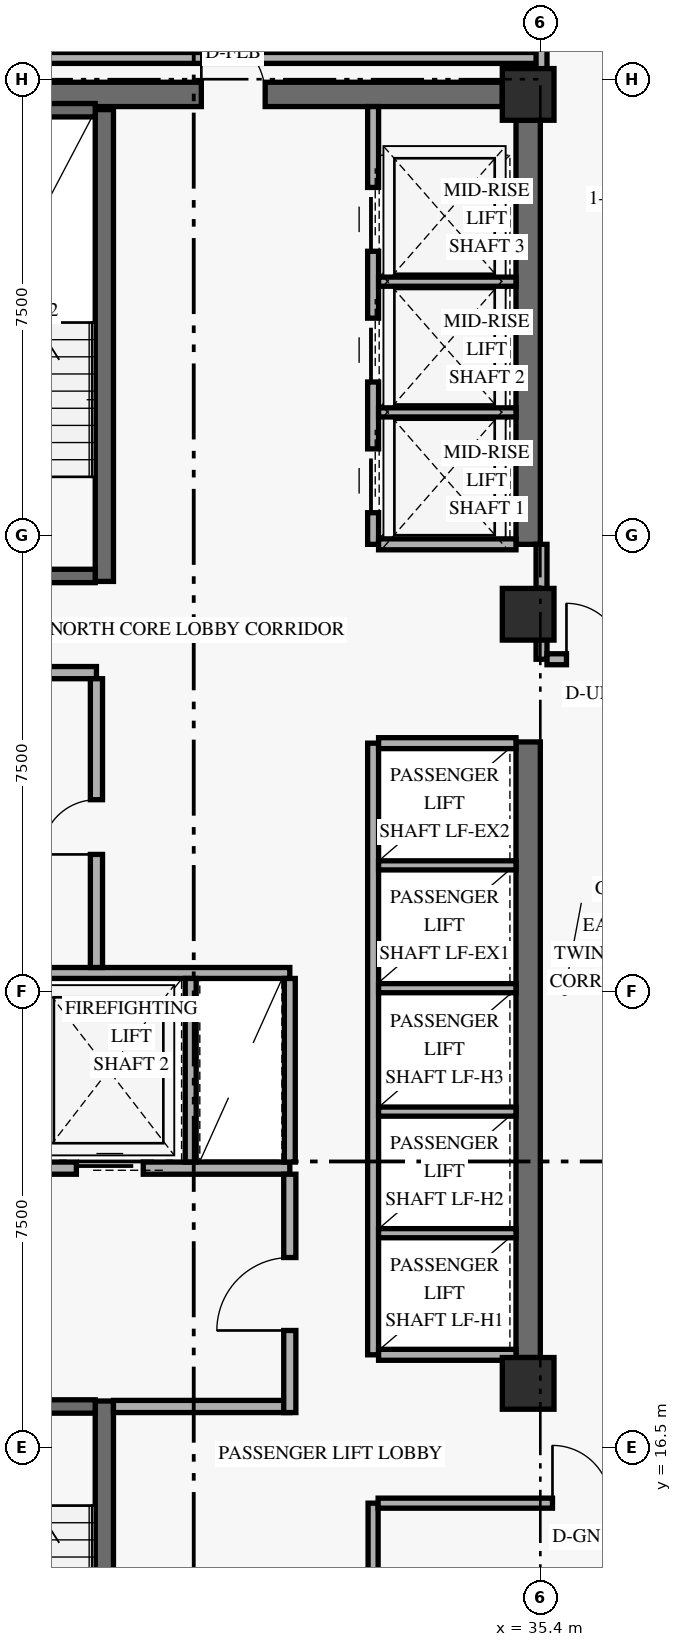
"""IFC4 building model, lengths in metres.
Left out: names, types, materials, properties, quantities, classifications, styles, units other than length and angle.
Written with IfcOpenShell. Run it as: python <this file> out.ifc"""

import sys

from ifc_helpers import new_model, si_unit, direction, frame, frame_2d, origin, origin_2d, place, context, subcontext, project, spatial, rectangle, extrude, element, fill, save


model = new_model("IFC4")
c1 = context("Model", 3, precision=1e-05, world=origin(), true_north=direction((0.0, 1.0)))
c2 = subcontext(c1, "Body", "Model", "MODEL_VIEW")
j1 = project(units=[si_unit("LENGTHUNIT", "METRE"), si_unit("PLANEANGLEUNIT", "RADIAN")], contexts=[c1])
p1 = place(None, origin())
s1 = spatial("IfcSite", under=j1, at=p1, CompositionType="ELEMENT")
p2 = place(p1, origin())
s2 = spatial("IfcBuilding", under=s1, at=p2, CompositionType="ELEMENT")
p3 = place(p2, frame((0.0, 0.0, 106.2)))
s3 = spatial("IfcBuildingStorey", under=s2, at=p3, CompositionType="ELEMENT", Elevation=106.2)
p4 = place(p3, frame((35.2, 17.975, 0.0), z_axis=(0.0, 0.0, 1.0), x_axis=(0.0, 1.0, 0.0)))
e1 = element("IfcWall", 1, at=p4, inside=s3, PredefinedType="SHEAR", context=c2, shape_type="SweptSolid", body=[
    extrude(rectangle(XDim=10.125, YDim=0.4, at=frame_2d((5.062, 0.0))), origin(), (0.0, 0.0, 1.0), 2.749),
])
p5 = place(p3, frame((35.2, 31.35, 0.0), z_axis=(0.0, 0.0, 1.0), x_axis=(0.0, 1.0, 0.0)))
e2 = element("IfcWall", 2, at=p5, inside=s3, PredefinedType="SHEAR", context=c2, shape_type="SweptSolid", body=[
    extrude(rectangle(XDim=6.975, YDim=0.4, at=frame_2d((3.487, 0.0))), origin(), (0.0, 0.0, 1.0), 2.749),
])
p6 = place(p3, frame((24.625, 38.75, 0.0), z_axis=(0.0, 0.0, 1.0), x_axis=(1.0, 0.0, 0.0)))
e3 = element("IfcWall", 3, at=p6, inside=s3, PredefinedType="SHEAR", context=c2, shape_type="SweptSolid", body=[
    extrude(rectangle(XDim=10.15, YDim=0.4, at=frame_2d((5.075, 0.0))), origin(), (0.0, 0.0, 1.0), 3.36),
])
p7 = place(p6, frame((5.2, 0.0, 0.0)))
e4 = element("IfcOpeningElement", 4, at=p7, cuts=e3, PredefinedType="OPENING", context=c2, shape_type="SweptSolid", body=[
    extrude(rectangle(XDim=1.05, YDim=2.15, at=frame_2d((0.525, 1.075))), frame((0.0, 0.21, 0.0), z_axis=(0.0, -1.0, 0.0), x_axis=(1.0, 0.0, 0.0)), (0.0, 0.0, 1.0), 0.42),
])
p8 = place(p3, frame((28.23, 9.5, 0.0), z_axis=(0.0, 0.0, 1.0), x_axis=(0.0, 1.0, 0.0)))
e5 = element("IfcWall", 5, at=p8, inside=s3, PredefinedType="SHEAR", context=c2, shape_type="SweptSolid", body=[
    extrude(rectangle(XDim=7.76, YDim=0.3, at=frame_2d((3.88, 0.0))), origin(), (0.0, 0.0, 1.0), 3.36),
])
p9 = place(p3, frame((24.92, 17.17, 0.0), z_axis=(0.0, 0.0, 1.0), x_axis=(1.0, 0.0, 0.0)))
e6 = element("IfcWall", 6, at=p9, inside=s3, PredefinedType="SHEAR", context=c2, shape_type="SweptSolid", body=[
    extrude(rectangle(XDim=3.16, YDim=0.22, at=frame_2d((1.58, 0.0))), origin(), (0.0, 0.0, 1.0), 3.36),
])
p10 = place(p9, frame((0.78, 0.0, 0.0)))
e7 = element("IfcOpeningElement", 7, at=p10, cuts=e6, PredefinedType="OPENING", context=c2, shape_type="SweptSolid", body=[
    extrude(rectangle(XDim=1.05, YDim=2.15, at=frame_2d((0.525, 1.075))), frame((0.0, 0.12, 0.0), z_axis=(0.0, -1.0, 0.0), x_axis=(1.0, 0.0, 0.0)), (0.0, 0.0, 1.0), 0.24),
])
p11 = place(p3, frame((28.23, 30.74, 0.0), z_axis=(0.0, 0.0, 1.0), x_axis=(0.0, 1.0, 0.0)))
e8 = element("IfcWall", 8, at=p11, inside=s3, PredefinedType="SHEAR", context=c2, shape_type="SweptSolid", body=[
    extrude(rectangle(XDim=7.76, YDim=0.3, at=frame_2d((3.88, 0.0))), origin(), (0.0, 0.0, 1.0), 3.36),
])
p12 = place(p3, frame((24.92, 30.83, 0.0), z_axis=(0.0, 0.0, 1.0), x_axis=(1.0, 0.0, 0.0)))
e9 = element("IfcWall", 9, at=p12, inside=s3, PredefinedType="SHEAR", context=c2, shape_type="SweptSolid", body=[
    extrude(rectangle(XDim=3.16, YDim=0.22, at=frame_2d((1.58, 0.0))), origin(), (0.0, 0.0, 1.0), 3.36),
])
p13 = place(p12, frame((0.78, 0.0, 0.0)))
e10 = element("IfcOpeningElement", 10, at=p13, cuts=e9, PredefinedType="OPENING", context=c2, shape_type="SweptSolid", body=[
    extrude(rectangle(XDim=1.05, YDim=2.15, at=frame_2d((0.525, 1.075))), frame((0.0, 0.12, 0.0), z_axis=(0.0, -1.0, 0.0), x_axis=(1.0, 0.0, 0.0)), (0.0, 0.0, 1.0), 0.24),
])
p14 = place(p3, frame((24.92, 38.49, 0.0), z_axis=(0.0, 0.0, 1.0), x_axis=(1.0, 0.0, 0.0)))
e11 = element("IfcWall", 11, at=p14, inside=s3, PredefinedType="SHEAR", context=c2, shape_type="SweptSolid", body=[
    extrude(rectangle(XDim=3.16, YDim=0.22, at=frame_2d((1.58, 0.0))), origin(), (0.0, 0.0, 1.0), 3.36),
])
for number, where, z_axis, x_axis in (
    (12, (35.2, 17.55, 0.0), (0.0, 0.0, 1.0), (1.0, 0.0, 0.0)),
    (13, (35.2, 30.2, 0.0), (0.0, 0.0, 1.0), (1.0, 0.0, 0.0)),
    (14, (35.2, 38.75, 0.0), (0.0, 0.0, 1.0), (1.0, 0.0, 0.0)),
):
    element("IfcColumn", number, at=place(p3, frame(where, z_axis=z_axis, x_axis=x_axis)), inside=s3, PredefinedType="COLUMN", context=c2, shape_type="SweptSolid", body=[
        extrude(rectangle(XDim=0.85, YDim=0.85, at=origin_2d()), origin(), (0.0, 0.0, 1.0), 3.6),
    ])
p15 = place(p3, frame((24.45, 21.09, 0.0), z_axis=(0.0, 0.0, 1.0), x_axis=(1.0, 0.0, 0.0)))
e15 = element("IfcWall", 15, at=p15, inside=s3, PredefinedType="STANDARD", context=c2, shape_type="SweptSolid", body=[
    extrude(rectangle(XDim=6.83, YDim=0.2, at=frame_2d((3.415, 0.0))), origin(), (0.0, 0.0, 1.0), 3.36),
])
p16 = place(p15, frame((0.72, 0.0, 0.0)))
e16 = element("IfcOpeningElement", 16, at=p16, cuts=e15, PredefinedType="OPENING", context=c2, shape_type="SweptSolid", body=[
    extrude(rectangle(XDim=1.1, YDim=2.2, at=frame_2d((0.55, 1.1))), frame((0.0, 0.11, 0.0), z_axis=(0.0, -1.0, 0.0), x_axis=(1.0, 0.0, 0.0)), (0.0, 0.0, 1.0), 0.22),
])
p17 = place(p15, frame((3.32, 0.0, 0.0)))
e17 = element("IfcOpeningElement", 17, at=p17, cuts=e15, PredefinedType="OPENING", context=c2, shape_type="SweptSolid", body=[
    extrude(rectangle(XDim=1.1, YDim=2.2, at=frame_2d((0.55, 1.1))), frame((0.0, 0.11, 0.0), z_axis=(0.0, -1.0, 0.0), x_axis=(1.0, 0.0, 0.0)), (0.0, 0.0, 1.0), 0.22),
])
p18 = place(p3, frame((28.38, 17.17, 0.0), z_axis=(0.0, 0.0, 1.0), x_axis=(1.0, 0.0, 0.0)))
e18 = element("IfcWall", 18, at=p18, inside=s3, PredefinedType="STANDARD", context=c2, shape_type="SweptSolid", body=[
    extrude(rectangle(XDim=2.9, YDim=0.2, at=frame_2d((1.45, 0.0))), origin(), (0.0, 0.0, 1.0), 3.36),
])
p19 = place(p3, frame((31.28, 17.07, 0.0), z_axis=(0.0, 0.0, 1.0), x_axis=(0.0, 1.0, 0.0)))
e19 = element("IfcWall", 19, at=p19, inside=s3, PredefinedType="STANDARD", context=c2, shape_type="SweptSolid", body=[
    extrude(rectangle(XDim=3.92, YDim=0.2, at=frame_2d((1.96, 0.0))), origin(), (0.0, 0.0, 1.0), 2.731),
])
p20 = place(p19, frame((1.35, 0.0, 0.0)))
e20 = element("IfcOpeningElement", 20, at=p20, cuts=e19, PredefinedType="OPENING", context=c2, shape_type="SweptSolid", body=[
    extrude(rectangle(XDim=1.2, YDim=2.15, at=frame_2d((0.6, 1.075))), frame((0.0, 0.11, 0.0), z_axis=(0.0, -1.0, 0.0), x_axis=(1.0, 0.0, 0.0)), (0.0, 0.0, 1.0), 0.22),
])
p21 = place(p3, frame((24.45, 24.3, 0.0), z_axis=(0.0, 0.0, 1.0), x_axis=(1.0, 0.0, 0.0)))
e21 = element("IfcWall", 21, at=p21, inside=s3, PredefinedType="STANDARD", context=c2, shape_type="SweptSolid", body=[
    extrude(rectangle(XDim=6.83, YDim=0.18, at=frame_2d((3.415, 0.0))), origin(), (0.0, 0.0, 1.0), 3.36),
])
for number, where, z_axis, x_axis in (
    (22, (29.65, 21.19, 0.0), (0.0, 0.0, 1.0), (0.0, 1.0, 0.0)),
    (23, (31.28, 21.19, 0.0), (0.0, 0.0, 1.0), (0.0, 1.0, 0.0)),
):
    element("IfcWall", number, at=place(p3, frame(where, z_axis=z_axis, x_axis=x_axis)), inside=s3, PredefinedType="STANDARD", context=c2, shape_type="SweptSolid", body=[
        extrude(rectangle(XDim=3.02, YDim=0.18, at=frame_2d((1.51, 0.0))), origin(), (0.0, 0.0, 1.0), 3.36),
    ])
p22 = place(p3, frame((24.45, 29.24, 0.0), z_axis=(0.0, 0.0, 1.0), x_axis=(1.0, 0.0, 0.0)))
e24 = element("IfcWall", 24, at=p22, inside=s3, PredefinedType="STANDARD", context=c2, shape_type="SweptSolid", body=[
    extrude(rectangle(XDim=3.65, YDim=0.2, at=frame_2d((1.825, 0.0))), origin(), (0.0, 0.0, 1.0), 3.36),
])
p23 = place(p3, frame((28.1, 24.39, 0.0), z_axis=(0.0, 0.0, 1.0), x_axis=(0.0, 1.0, 0.0)))
e25 = element("IfcWall", 25, at=p23, inside=s3, PredefinedType="STANDARD", context=c2, shape_type="SweptSolid", body=[
    extrude(rectangle(XDim=4.75, YDim=0.2, at=frame_2d((2.375, 0.0))), origin(), (0.0, 0.0, 1.0), 3.36),
])
p24 = place(p23, frame((1.86, 0.0, 0.0)))
e26 = element("IfcOpeningElement", 26, at=p24, cuts=e25, PredefinedType="OPENING", context=c2, shape_type="SweptSolid", body=[
    extrude(rectangle(XDim=0.9, YDim=2.1, at=frame_2d((0.45, 1.05))), frame((0.0, 0.11, 0.0), z_axis=(0.0, -1.0, 0.0), x_axis=(1.0, 0.0, 0.0)), (0.0, 0.0, 1.0), 0.22),
])
p25 = place(p3, frame((32.65, 18.02, 0.0), z_axis=(0.0, 0.0, 1.0), x_axis=(0.0, 1.0, 0.0)))
e27 = element("IfcWall", 27, at=p25, inside=s3, PredefinedType="STANDARD", context=c2, shape_type="SweptSolid", body=[
    extrude(rectangle(XDim=10.06, YDim=0.18, at=frame_2d((5.03, 0.0))), origin(), (0.0, 0.0, 1.0), 3.36),
])
for number, where, z_axis, x_axis in (
    (28, (32.74, 18.02, 0.0), (0.0, 0.0, 1.0), (1.0, 0.0, 0.0)),
    (29, (32.74, 28.08, 0.0), (0.0, 0.0, 1.0), (1.0, 0.0, 0.0)),
):
    element("IfcWall", number, at=place(p3, frame(where, z_axis=z_axis, x_axis=x_axis)), inside=s3, PredefinedType="STANDARD", context=c2, shape_type="SweptSolid", body=[
        extrude(rectangle(XDim=2.26, YDim=0.18, at=frame_2d((1.13, 0.0))), origin(), (0.0, 0.0, 1.0), 3.36),
    ])
for number, where, z_axis, x_axis in (
    (30, (32.74, 20.02, 0.0), (0.0, 0.0, 1.0), (1.0, 0.0, 0.0)),
    (31, (32.74, 22.02, 0.0), (0.0, 0.0, 1.0), (1.0, 0.0, 0.0)),
    (32, (32.74, 24.05, 0.0), (0.0, 0.0, 1.0), (1.0, 0.0, 0.0)),
    (33, (32.74, 26.07, 0.0), (0.0, 0.0, 1.0), (1.0, 0.0, 0.0)),
):
    element("IfcWall", number, at=place(p3, frame(where, z_axis=z_axis, x_axis=x_axis)), inside=s3, PredefinedType="STANDARD", context=c2, shape_type="SweptSolid", body=[
        extrude(rectangle(XDim=2.26, YDim=0.15, at=frame_2d((1.13, 0.0))), origin(), (0.0, 0.0, 1.0), 3.36),
    ])
p26 = place(p3, frame((32.65, 31.35, 0.0), z_axis=(0.0, 0.0, 1.0), x_axis=(0.0, 1.0, 0.0)))
e34 = element("IfcWall", 34, at=p26, inside=s3, PredefinedType="STANDARD", context=c2, shape_type="SweptSolid", body=[
    extrude(rectangle(XDim=7.2, YDim=0.18, at=frame_2d((3.6, 0.0))), origin(), (0.0, 0.0, 1.0), 3.36),
])
p27 = place(p26, frame((0.52, 0.0, 0.0)))
e35 = element("IfcOpeningElement", 35, at=p27, cuts=e34, PredefinedType="OPENING", context=c2, shape_type="SweptSolid", body=[
    extrude(rectangle(XDim=1.05, YDim=2.2, at=frame_2d((0.525, 1.1))), frame((0.0, 0.1, 0.0), z_axis=(0.0, -1.0, 0.0), x_axis=(1.0, 0.0, 0.0)), (0.0, 0.0, 1.0), 0.2),
])
p28 = place(p26, frame((2.67, 0.0, 0.0)))
e36 = element("IfcOpeningElement", 36, at=p28, cuts=e34, PredefinedType="OPENING", context=c2, shape_type="SweptSolid", body=[
    extrude(rectangle(XDim=1.05, YDim=2.2, at=frame_2d((0.525, 1.1))), frame((0.0, 0.1, 0.0), z_axis=(0.0, -1.0, 0.0), x_axis=(1.0, 0.0, 0.0)), (0.0, 0.0, 1.0), 0.2),
])
p29 = place(p26, frame((4.82, 0.0, 0.0)))
e37 = element("IfcOpeningElement", 37, at=p29, cuts=e34, PredefinedType="OPENING", context=c2, shape_type="SweptSolid", body=[
    extrude(rectangle(XDim=1.05, YDim=2.2, at=frame_2d((0.525, 1.1))), frame((0.0, 0.1, 0.0), z_axis=(0.0, -1.0, 0.0), x_axis=(1.0, 0.0, 0.0)), (0.0, 0.0, 1.0), 0.2),
])
p30 = place(p3, frame((32.74, 31.35, 0.0), z_axis=(0.0, 0.0, 1.0), x_axis=(1.0, 0.0, 0.0)))
e38 = element("IfcWall", 38, at=p30, inside=s3, PredefinedType="STANDARD", context=c2, shape_type="SweptSolid", body=[
    extrude(rectangle(XDim=2.26, YDim=0.18, at=frame_2d((1.13, 0.0))), origin(), (0.0, 0.0, 1.0), 3.36),
])
for number, where, z_axis, x_axis in (
    (39, (32.74, 33.52, 0.0), (0.0, 0.0, 1.0), (1.0, 0.0, 0.0)),
    (40, (32.74, 35.67, 0.0), (0.0, 0.0, 1.0), (1.0, 0.0, 0.0)),
):
    element("IfcWall", number, at=place(p3, frame(where, z_axis=z_axis, x_axis=x_axis)), inside=s3, PredefinedType="STANDARD", context=c2, shape_type="SweptSolid", body=[
        extrude(rectangle(XDim=2.26, YDim=0.15, at=frame_2d((1.13, 0.0))), origin(), (0.0, 0.0, 1.0), 3.36),
    ])
p31 = place(p3, frame((32.65, 9.5, 0.0), z_axis=(0.0, 0.0, 1.0), x_axis=(0.0, 1.0, 0.0)))
e41 = element("IfcWall", 41, at=p31, inside=s3, PredefinedType="PARTITIONING", context=c2, shape_type="SweptSolid", body=[
    extrude(rectangle(XDim=6.08, YDim=0.165, at=frame_2d((3.04, 0.0))), origin(), (0.0, 0.0, 1.0), 3.36),
])
p32 = place(p3, frame((32.732, 15.58, 0.0), z_axis=(0.0, 0.0, 1.0), x_axis=(1.0, 0.0, 0.0)))
e42 = element("IfcWall", 42, at=p32, inside=s3, PredefinedType="PARTITIONING", context=c2, shape_type="SweptSolid", body=[
    extrude(rectangle(XDim=5.218, YDim=0.165, at=frame_2d((2.609, 0.0))), origin(), (0.0, 0.0, 1.0), 2.731),
])
p33 = place(p32, frame((2.867, 0.0, 0.0)))
e43 = element("IfcOpeningElement", 43, at=p33, cuts=e42, PredefinedType="OPENING", context=c2, shape_type="SweptSolid", body=[
    extrude(rectangle(XDim=0.95, YDim=2.15, at=frame_2d((0.475, 1.075))), frame((0.0, 0.093, 0.0), z_axis=(0.0, -1.0, 0.0), x_axis=(1.0, 0.0, 0.0)), (0.0, 0.0, 1.0), 0.185),
])
p34 = place(p3, frame((35.42, 29.46, 0.0), z_axis=(0.0, 0.0, 1.0), x_axis=(0.0, 1.0, 0.0)))
e44 = element("IfcWall", 44, at=p34, inside=s3, PredefinedType="STANDARD", context=c2, shape_type="SweptSolid", body=[
    extrude(rectangle(XDim=1.89, YDim=0.18, at=frame_2d((0.945, 0.0))), origin(), (0.0, 0.0, 1.0), 2.731),
])
p35 = place(p3, frame((35.51, 29.46, 0.0), z_axis=(0.0, 0.0, 1.0), x_axis=(1.0, 0.0, 0.0)))
e45 = element("IfcWall", 45, at=p35, inside=s3, PredefinedType="STANDARD", context=c2, shape_type="SweptSolid", body=[
    extrude(rectangle(XDim=10.09, YDim=0.18, at=frame_2d((5.045, 0.0))), origin(), (0.0, 0.0, 1.0), 2.731),
])
p36 = place(p35, frame((0.32, 0.0, 0.0)))
e46 = element("IfcOpeningElement", 46, at=p36, cuts=e45, PredefinedType="OPENING", context=c2, shape_type="SweptSolid", body=[
    extrude(rectangle(XDim=0.92, YDim=2.15, at=frame_2d((0.46, 1.075))), frame((0.0, 0.1, 0.0), z_axis=(0.0, -1.0, 0.0), x_axis=(1.0, 0.0, 0.0)), (0.0, 0.0, 1.0), 0.2),
])
p37 = place(p3, frame((23.85, 39.35, 0.0), z_axis=(0.0, 0.0, 1.0), x_axis=(1.0, 0.0, 0.0)))
e47 = element("IfcWall", 47, at=p37, inside=s3, PredefinedType="STANDARD", context=c2, shape_type="SweptSolid", body=[
    extrude(rectangle(XDim=11.57, YDim=0.18, at=frame_2d((5.785, 0.0))), origin(), (0.0, 0.0, 1.0), 2.731),
])
p38 = place(p3, frame((35.42, 38.75, 0.0), z_axis=(0.0, 0.0, 1.0), x_axis=(0.0, 1.0, 0.0)))
e48 = element("IfcWall", 48, at=p38, inside=s3, PredefinedType="PARTITIONING", context=c2, shape_type="SweptSolid", body=[
    extrude(rectangle(XDim=6.27, YDim=0.18, at=frame_2d((3.135, 0.0))), origin(), (0.0, 0.0, 1.0), 2.731),
])
p39 = place(p17, origin())
e49 = element("IfcDoor", 49, at=p39, inside=s3, OperationType="SLIDING_TO_LEFT", PredefinedType="DOOR", context=c2, shape_type="SweptSolid", body=[
    extrude(rectangle(XDim=1.1, YDim=2.2, at=frame_2d((0.55, 1.1))), frame((0.0, 0.025, 0.0), z_axis=(0.0, -1.0, 0.0), x_axis=(1.0, 0.0, 0.0)), (0.0, 0.0, 1.0), 0.05),
])
fill(e17, e49)
p40 = place(p20, origin())
e50 = element("IfcDoor", 50, at=p40, inside=s3, OperationType="SINGLE_SWING_LEFT", PredefinedType="DOOR", context=c2, shape_type="SweptSolid", body=[
    extrude(rectangle(XDim=1.2, YDim=2.15, at=frame_2d((0.6, 1.075))), frame((0.0, 0.025, 0.0), z_axis=(0.0, -1.0, 0.0), x_axis=(1.0, 0.0, 0.0)), (0.0, 0.0, 1.0), 0.05),
])
fill(e20, e50)
p41 = place(p24, origin())
e51 = element("IfcDoor", 51, at=p41, inside=s3, OperationType="SINGLE_SWING_LEFT", PredefinedType="DOOR", context=c2, shape_type="SweptSolid", body=[
    extrude(rectangle(XDim=0.9, YDim=2.1, at=frame_2d((0.45, 1.05))), frame((0.0, 0.025, 0.0), z_axis=(0.0, -1.0, 0.0), x_axis=(1.0, 0.0, 0.0)), (0.0, 0.0, 1.0), 0.05),
])
fill(e26, e51)
p42 = place(p27, origin())
e52 = element("IfcDoor", 52, at=p42, inside=s3, OperationType="SLIDING_TO_LEFT", PredefinedType="DOOR", context=c2, shape_type="SweptSolid", body=[
    extrude(rectangle(XDim=1.05, YDim=2.2, at=frame_2d((0.525, 1.1))), frame((0.0, 0.025, 0.0), z_axis=(0.0, -1.0, 0.0), x_axis=(1.0, 0.0, 0.0)), (0.0, 0.0, 1.0), 0.05),
])
fill(e35, e52)
p43 = place(p28, origin())
e53 = element("IfcDoor", 53, at=p43, inside=s3, OperationType="SLIDING_TO_LEFT", PredefinedType="DOOR", context=c2, shape_type="SweptSolid", body=[
    extrude(rectangle(XDim=1.05, YDim=2.2, at=frame_2d((0.525, 1.1))), frame((0.0, 0.025, 0.0), z_axis=(0.0, -1.0, 0.0), x_axis=(1.0, 0.0, 0.0)), (0.0, 0.0, 1.0), 0.05),
])
fill(e36, e53)
p44 = place(p29, origin())
e54 = element("IfcDoor", 54, at=p44, inside=s3, OperationType="SLIDING_TO_LEFT", PredefinedType="DOOR", context=c2, shape_type="SweptSolid", body=[
    extrude(rectangle(XDim=1.05, YDim=2.2, at=frame_2d((0.525, 1.1))), frame((0.0, 0.025, 0.0), z_axis=(0.0, -1.0, 0.0), x_axis=(1.0, 0.0, 0.0)), (0.0, 0.0, 1.0), 0.05),
])
fill(e37, e54)
p45 = place(p33, origin())
e55 = element("IfcDoor", 55, at=p45, inside=s3, OperationType="SINGLE_SWING_LEFT", PredefinedType="DOOR", context=c2, shape_type="SweptSolid", body=[
    extrude(rectangle(XDim=0.95, YDim=2.15, at=frame_2d((0.475, 1.075))), frame((0.0, 0.025, 0.0), z_axis=(0.0, -1.0, 0.0), x_axis=(1.0, 0.0, 0.0)), (0.0, 0.0, 1.0), 0.05),
])
fill(e43, e55)
p46 = place(p7, frame((1.05, 0.0, 0.0), z_axis=(0.0, 0.0, 1.0), x_axis=(-1.0, 0.0, 0.0)))
e56 = element("IfcDoor", 56, at=p46, inside=s3, OperationType="SINGLE_SWING_RIGHT", PredefinedType="DOOR", context=c2, shape_type="SweptSolid", body=[
    extrude(rectangle(XDim=1.05, YDim=2.15, at=frame_2d((0.525, 1.075))), frame((0.0, 0.025, 0.0), z_axis=(0.0, -1.0, 0.0), x_axis=(1.0, 0.0, 0.0)), (0.0, 0.0, 1.0), 0.05),
])
fill(e4, e56)
p47 = place(p36, origin())
e57 = element("IfcDoor", 57, at=p47, inside=s3, OperationType="SINGLE_SWING_LEFT", PredefinedType="DOOR", context=c2, shape_type="SweptSolid", body=[
    extrude(rectangle(XDim=0.92, YDim=2.15, at=frame_2d((0.46, 1.075))), frame((0.0, 0.025, 0.0), z_axis=(0.0, -1.0, 0.0), x_axis=(1.0, 0.0, 0.0)), (0.0, 0.0, 1.0), 0.05),
])
fill(e46, e57)
save(model, sys.argv[1])
